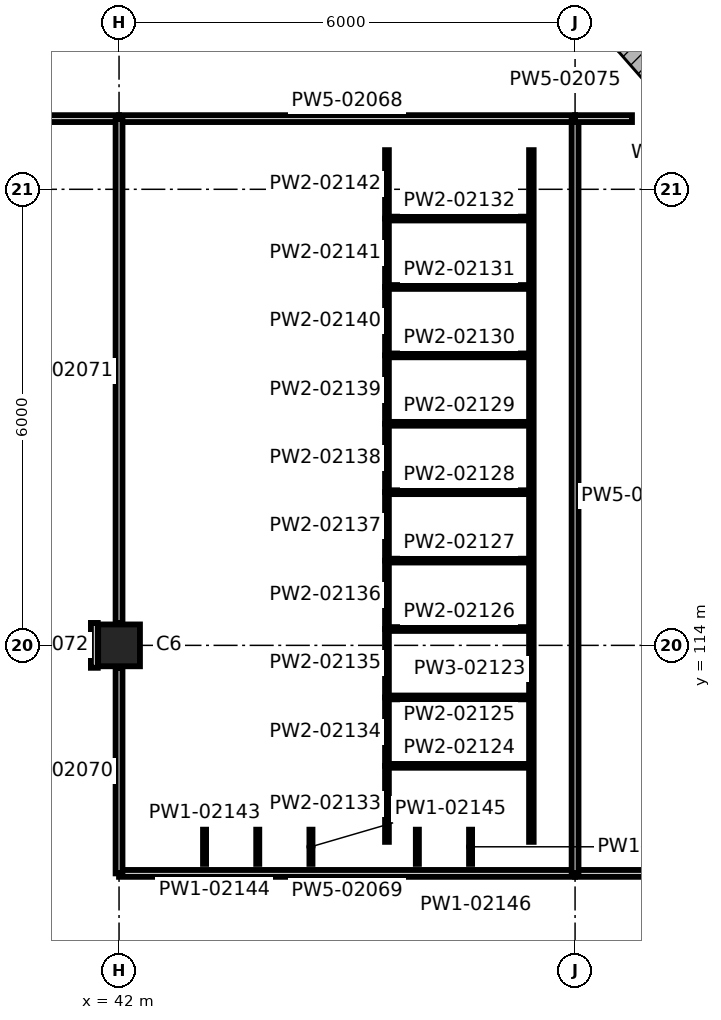
"""IFC4 building model, lengths in metres.
Left out: names, types, materials, properties, quantities, classifications, styles, units other than length and angle.
Written with IfcOpenShell. Run it as: python <this file> out.ifc"""

import sys

from ifc_helpers import new_model, si_unit, direction, frame, frame_2d, origin, origin_2d, place, context, subcontext, project, spatial, polyline, rectangle, outline, extrude, element, fill, save


model = new_model("IFC4")
c1 = context("Model", 3, precision=1e-05, world=origin(), true_north=direction((0.0, 1.0)))
c2 = subcontext(c1, "Body", "Model", "MODEL_VIEW")
j1 = project(units=[si_unit("LENGTHUNIT", "METRE"), si_unit("PLANEANGLEUNIT", "RADIAN")], contexts=[c1])
p1 = place(None, origin())
s1 = spatial("IfcSite", under=j1, at=p1, CompositionType="ELEMENT")
p2 = place(p1, origin())
s2 = spatial("IfcBuilding", under=s1, at=p2, CompositionType="ELEMENT")
p3 = place(p2, frame((0.0, 0.0, 12.0)))
s3 = spatial("IfcBuildingStorey", under=s2, at=p3, CompositionType="ELEMENT", Elevation=12.0)
p4 = place(p3, frame((42.0, 114.0, 0.0), z_axis=(0.0, 0.0, 1.0), x_axis=(1.0, 0.0, 0.0)))
e1 = element("IfcColumn", 1, at=p4, inside=s3, PredefinedType="COLUMN", context=c2, shape_type="SweptSolid", body=[
    extrude(rectangle(XDim=0.55, YDim=0.55, at=origin_2d()), origin(), (0.0, 0.0, 1.0), 4.5),
])
p5 = place(p3, frame((48.56, 121.825, 0.0), z_axis=(-0.74138193161, -0.495258620594, 0.452848462745), x_axis=(-0.555487117891, 0.831525141854, -1.792587e-05)))
e2 = element("IfcWall", 2, at=p5, inside=s3, PredefinedType="SOLIDWALL", context=c2, shape_type="SweptSolid", body=[
    extrude(outline(polyline([(0.0, 0.0), (0.897, 2.776e-17), (0.759, -4.655), (0.138, -4.654), (0.0, 0.0)])), origin(), (-9.955e-05, 0.453, 0.892), 0.449),
])
p6 = place(p3, frame((49.152, 121.151, 0.0), z_axis=(-0.67027340996, -0.587941516676, 0.452833665786), x_axis=(-0.659435029258, 0.751761559077, -2.1938488e-05)))
e3 = element("IfcWall", 3, at=p6, inside=s3, PredefinedType="SOLIDWALL", context=c2, shape_type="SweptSolid", body=[
    extrude(outline(polyline([(0.0, 0.0), (0.897, 2.776e-17), (0.759, -4.654), (0.138, -4.654), (0.0, 0.0)])), origin(), (0.0, 0.453, 0.892), 0.449),
])
p7 = place(p3, frame((49.826, 120.56, 0.0), z_axis=(-0.58793091204, -0.670281410701, 0.452835591728), x_axis=(-0.75177274522, 0.659422276866, 1.779507e-05)))
e4 = element("IfcWall", 4, at=p7, inside=s3, PredefinedType="SOLIDWALL", context=c2, shape_type="SweptSolid", body=[
    extrude(outline(polyline([(0.0, 0.0), (0.897, -5.551e-17), (0.759, -4.654), (0.138, -4.654), (0.0, 0.0)])), origin(), (-0.0, 0.453, 0.892), 0.449),
])
p8 = place(p3, frame((24.0, 120.93, 0.0), z_axis=(0.0, 0.0, 1.0), x_axis=(1.0, 0.0, 0.0)))
e5 = element("IfcWall", 5, at=p8, inside=s3, PredefinedType="PARTITIONING", context=c2, shape_type="SweptSolid", body=[
    extrude(rectangle(XDim=18.0, YDim=0.09, at=frame_2d((9.0, 0.0))), origin(), (0.0, 0.0, 1.0), 3.55),
])
p9 = place(p8, frame((9.85, 0.0, 0.0)))
e6 = element("IfcOpeningElement", 6, at=p9, cuts=e5, PredefinedType="OPENING", context=c2, shape_type="SweptSolid", body=[
    extrude(rectangle(XDim=1.8, YDim=2.1, at=frame_2d((0.9, 1.05))), frame((0.0, 0.055, 0.0), z_axis=(0.0, -1.0, 0.0), x_axis=(1.0, 0.0, 0.0)), (0.0, 0.0, 1.0), 0.11),
])
p10 = place(p8, frame((1.1, 0.0, 0.0)))
e7 = element("IfcOpeningElement", 7, at=p10, cuts=e5, PredefinedType="OPENING", context=c2, shape_type="SweptSolid", body=[
    extrude(rectangle(XDim=1.0, YDim=2.1, at=frame_2d((0.5, 1.05))), frame((0.0, 0.055, 0.0), z_axis=(0.0, -1.0, 0.0), x_axis=(1.0, 0.0, 0.0)), (0.0, 0.0, 1.0), 0.11),
])
for number, where, z_axis, x_axis in (
    (8, (42.0, 120.93, 0.0), (0.0, 0.0, 1.0), (1.0, 0.0, 0.0)),
    (9, (42.0, 111.0, 0.0), (0.0, 0.0, 1.0), (1.0, 0.0, 0.0)),
):
    element("IfcWall", number, at=place(p3, frame(where, z_axis=z_axis, x_axis=x_axis)), inside=s3, PredefinedType="PARTITIONING", context=c2, shape_type="SweptSolid", body=[
        extrude(rectangle(XDim=6.0, YDim=0.09, at=frame_2d((3.0, 0.0))), origin(), (0.0, 0.0, 1.0), 4.25),
    ])
p11 = place(p3, frame((42.0, 111.0, 0.0), z_axis=(0.0, 0.0, 1.0), x_axis=(0.0, 1.0, 0.0)))
e10 = element("IfcWall", 10, at=p11, inside=s3, PredefinedType="PARTITIONING", context=c2, shape_type="SweptSolid", body=[
    extrude(rectangle(XDim=2.705, YDim=0.09, at=frame_2d((1.353, 0.0))), origin(), (0.0, 0.0, 1.0), 4.25),
])
p12 = place(p3, frame((42.0, 114.295, 0.0), z_axis=(0.0, 0.0, 1.0), x_axis=(0.0, 1.0, 0.0)))
e11 = element("IfcWall", 11, at=p12, inside=s3, PredefinedType="PARTITIONING", context=c2, shape_type="SweptSolid", body=[
    extrude(rectangle(XDim=6.635, YDim=0.09, at=frame_2d((3.317, 0.0))), origin(), (0.0, 0.0, 1.0), 4.25),
])
p13 = place(p12, frame((1.255, 0.0, 0.0)))
e12 = element("IfcOpeningElement", 12, at=p13, cuts=e11, PredefinedType="OPENING", context=c2, shape_type="SweptSolid", body=[
    extrude(rectangle(XDim=0.92, YDim=2.04, at=frame_2d((0.46, 1.02))), frame((0.0, 0.055, 0.0), z_axis=(0.0, -1.0, 0.0), x_axis=(1.0, 0.0, 0.0)), (0.0, 0.0, 1.0), 0.11),
])
p14 = place(p3, frame((41.675, 113.705, 0.0), z_axis=(0.0, 0.0, 1.0), x_axis=(0.0, 1.0, 0.0)))
e13 = element("IfcWall", 13, at=p14, inside=s3, PredefinedType="PARTITIONING", context=c2, shape_type="SweptSolid", body=[
    extrude(rectangle(XDim=0.59, YDim=0.09, at=frame_2d((0.295, 0.0))), origin(), (0.0, 0.0, 1.0), 4.25),
])
p15 = place(p3, frame((48.0, 111.0, 0.0), z_axis=(0.0, 0.0, 1.0), x_axis=(1.0, 0.0, 0.0)))
e14 = element("IfcWall", 14, at=p15, inside=s3, PredefinedType="PARTITIONING", context=c2, shape_type="SweptSolid", body=[
    extrude(rectangle(XDim=6.0, YDim=0.09, at=frame_2d((3.0, 0.0))), origin(), (0.0, 0.0, 1.0), 4.25),
])
p16 = place(p3, frame((48.0, 111.0, 0.0), z_axis=(0.0, 0.0, 1.0), x_axis=(0.0, 1.0, 0.0)))
e15 = element("IfcWall", 15, at=p16, inside=s3, PredefinedType="PARTITIONING", context=c2, shape_type="SweptSolid", body=[
    extrude(rectangle(XDim=9.93, YDim=0.09, at=frame_2d((4.965, 0.0))), origin(), (0.0, 0.0, 1.0), 4.25),
])
p17 = place(p3, frame((48.0, 120.93, 0.0), z_axis=(0.0, 0.0, 1.0), x_axis=(1.0, 0.0, 0.0)))
e16 = element("IfcWall", 16, at=p17, inside=s3, PredefinedType="PARTITIONING", context=c2, shape_type="SweptSolid", body=[
    extrude(rectangle(XDim=0.749, YDim=0.09, at=frame_2d((0.374, 0.0))), origin(), (0.0, 0.0, 1.0), 4.25),
])
p18 = place(p3, frame((47.425, 111.415, 0.0), z_axis=(0.0, 0.0, 1.0), x_axis=(0.0, 1.0, 0.0)))
e17 = element("IfcWall", 17, at=p18, inside=s3, PredefinedType="PARTITIONING", context=c2, shape_type="SweptSolid", body=[
    extrude(rectangle(XDim=9.1, YDim=0.06, at=frame_2d((4.55, 0.0))), origin(), (0.0, 0.0, 1.0), 2.1),
])
for number, where, z_axis, x_axis in (
    (18, (45.525, 112.415, 0.0), (0.0, 0.0, 1.0), (1.0, 0.0, 0.0)),
    (19, (45.525, 113.315, 0.0), (0.0, 0.0, 1.0), (1.0, 0.0, 0.0)),
    (20, (45.525, 114.215, 0.0), (0.0, 0.0, 1.0), (1.0, 0.0, 0.0)),
    (21, (45.525, 115.115, 0.0), (0.0, 0.0, 1.0), (1.0, 0.0, 0.0)),
    (22, (45.525, 116.015, 0.0), (0.0, 0.0, 1.0), (1.0, 0.0, 0.0)),
    (23, (45.525, 116.915, 0.0), (0.0, 0.0, 1.0), (1.0, 0.0, 0.0)),
    (24, (45.525, 117.815, 0.0), (0.0, 0.0, 1.0), (1.0, 0.0, 0.0)),
    (25, (45.525, 118.715, 0.0), (0.0, 0.0, 1.0), (1.0, 0.0, 0.0)),
    (26, (45.525, 119.615, 0.0), (0.0, 0.0, 1.0), (1.0, 0.0, 0.0)),
):
    element("IfcWall", number, at=place(p3, frame(where, z_axis=z_axis, x_axis=x_axis)), inside=s3, PredefinedType="PARTITIONING", context=c2, shape_type="SweptSolid", body=[
        extrude(rectangle(XDim=1.9, YDim=0.05, at=frame_2d((0.95, 0.0))), origin(), (0.0, 0.0, 1.0), 2.1),
    ])
p19 = place(p3, frame((45.525, 111.415, 0.0), z_axis=(0.0, 0.0, 1.0), x_axis=(0.0, 1.0, 0.0)))
e27 = element("IfcWall", 27, at=p19, inside=s3, PredefinedType="PARTITIONING", context=c2, shape_type="SweptSolid", body=[
    extrude(rectangle(XDim=1.0, YDim=0.05, at=frame_2d((0.5, 0.0))), origin(), (0.0, 0.0, 1.0), 2.1),
])
p20 = place(p19, frame((0.09, 0.0, 0.0)))
e28 = element("IfcOpeningElement", 28, at=p20, cuts=e27, PredefinedType="OPENING", context=c2, shape_type="SweptSolid", body=[
    extrude(rectangle(XDim=0.82, YDim=2.0, at=frame_2d((0.41, 1.0))), frame((0.0, 0.035, 0.0), z_axis=(0.0, -1.0, 0.0), x_axis=(1.0, 0.0, 0.0)), (0.0, 0.0, 1.0), 0.07),
])
p21 = place(p3, frame((45.525, 112.415, 0.0), z_axis=(0.0, 0.0, 1.0), x_axis=(0.0, 1.0, 0.0)))
e29 = element("IfcWall", 29, at=p21, inside=s3, PredefinedType="PARTITIONING", context=c2, shape_type="SweptSolid", body=[
    extrude(rectangle(XDim=0.9, YDim=0.05, at=frame_2d((0.45, 0.0))), origin(), (0.0, 0.0, 1.0), 2.1),
])
p22 = place(p21, frame((0.075, 0.0, 0.0)))
e30 = element("IfcOpeningElement", 30, at=p22, cuts=e29, PredefinedType="OPENING", context=c2, shape_type="SweptSolid", body=[
    extrude(rectangle(XDim=0.75, YDim=2.0, at=frame_2d((0.375, 1.0))), frame((0.0, 0.035, 0.0), z_axis=(0.0, -1.0, 0.0), x_axis=(1.0, 0.0, 0.0)), (0.0, 0.0, 1.0), 0.07),
])
p23 = place(p3, frame((45.525, 113.315, 0.0), z_axis=(0.0, 0.0, 1.0), x_axis=(0.0, 1.0, 0.0)))
e31 = element("IfcWall", 31, at=p23, inside=s3, PredefinedType="PARTITIONING", context=c2, shape_type="SweptSolid", body=[
    extrude(rectangle(XDim=0.9, YDim=0.05, at=frame_2d((0.45, 0.0))), origin(), (0.0, 0.0, 1.0), 2.1),
])
p24 = place(p23, frame((0.075, 0.0, 0.0)))
e32 = element("IfcOpeningElement", 32, at=p24, cuts=e31, PredefinedType="OPENING", context=c2, shape_type="SweptSolid", body=[
    extrude(rectangle(XDim=0.75, YDim=2.0, at=frame_2d((0.375, 1.0))), frame((0.0, 0.035, 0.0), z_axis=(0.0, -1.0, 0.0), x_axis=(1.0, 0.0, 0.0)), (0.0, 0.0, 1.0), 0.07),
])
p25 = place(p3, frame((45.525, 114.215, 0.0), z_axis=(0.0, 0.0, 1.0), x_axis=(0.0, 1.0, 0.0)))
e33 = element("IfcWall", 33, at=p25, inside=s3, PredefinedType="PARTITIONING", context=c2, shape_type="SweptSolid", body=[
    extrude(rectangle(XDim=0.9, YDim=0.05, at=frame_2d((0.45, 0.0))), origin(), (0.0, 0.0, 1.0), 2.1),
])
p26 = place(p25, frame((0.075, 0.0, 0.0)))
e34 = element("IfcOpeningElement", 34, at=p26, cuts=e33, PredefinedType="OPENING", context=c2, shape_type="SweptSolid", body=[
    extrude(rectangle(XDim=0.75, YDim=2.0, at=frame_2d((0.375, 1.0))), frame((0.0, 0.035, 0.0), z_axis=(0.0, -1.0, 0.0), x_axis=(1.0, 0.0, 0.0)), (0.0, 0.0, 1.0), 0.07),
])
p27 = place(p3, frame((45.525, 115.115, 0.0), z_axis=(0.0, 0.0, 1.0), x_axis=(0.0, 1.0, 0.0)))
e35 = element("IfcWall", 35, at=p27, inside=s3, PredefinedType="PARTITIONING", context=c2, shape_type="SweptSolid", body=[
    extrude(rectangle(XDim=0.9, YDim=0.05, at=frame_2d((0.45, 0.0))), origin(), (0.0, 0.0, 1.0), 2.1),
])
p28 = place(p27, frame((0.075, 0.0, 0.0)))
e36 = element("IfcOpeningElement", 36, at=p28, cuts=e35, PredefinedType="OPENING", context=c2, shape_type="SweptSolid", body=[
    extrude(rectangle(XDim=0.75, YDim=2.0, at=frame_2d((0.375, 1.0))), frame((0.0, 0.035, 0.0), z_axis=(0.0, -1.0, 0.0), x_axis=(1.0, 0.0, 0.0)), (0.0, 0.0, 1.0), 0.07),
])
p29 = place(p3, frame((45.525, 116.015, 0.0), z_axis=(0.0, 0.0, 1.0), x_axis=(0.0, 1.0, 0.0)))
e37 = element("IfcWall", 37, at=p29, inside=s3, PredefinedType="PARTITIONING", context=c2, shape_type="SweptSolid", body=[
    extrude(rectangle(XDim=0.9, YDim=0.05, at=frame_2d((0.45, 0.0))), origin(), (0.0, 0.0, 1.0), 2.1),
])
p30 = place(p29, frame((0.075, 0.0, 0.0)))
e38 = element("IfcOpeningElement", 38, at=p30, cuts=e37, PredefinedType="OPENING", context=c2, shape_type="SweptSolid", body=[
    extrude(rectangle(XDim=0.75, YDim=2.0, at=frame_2d((0.375, 1.0))), frame((0.0, 0.035, 0.0), z_axis=(0.0, -1.0, 0.0), x_axis=(1.0, 0.0, 0.0)), (0.0, 0.0, 1.0), 0.07),
])
p31 = place(p3, frame((45.525, 116.915, 0.0), z_axis=(0.0, 0.0, 1.0), x_axis=(0.0, 1.0, 0.0)))
e39 = element("IfcWall", 39, at=p31, inside=s3, PredefinedType="PARTITIONING", context=c2, shape_type="SweptSolid", body=[
    extrude(rectangle(XDim=0.9, YDim=0.05, at=frame_2d((0.45, 0.0))), origin(), (0.0, 0.0, 1.0), 2.1),
])
p32 = place(p31, frame((0.075, 0.0, 0.0)))
e40 = element("IfcOpeningElement", 40, at=p32, cuts=e39, PredefinedType="OPENING", context=c2, shape_type="SweptSolid", body=[
    extrude(rectangle(XDim=0.75, YDim=2.0, at=frame_2d((0.375, 1.0))), frame((0.0, 0.035, 0.0), z_axis=(0.0, -1.0, 0.0), x_axis=(1.0, 0.0, 0.0)), (0.0, 0.0, 1.0), 0.07),
])
p33 = place(p3, frame((45.525, 117.815, 0.0), z_axis=(0.0, 0.0, 1.0), x_axis=(0.0, 1.0, 0.0)))
e41 = element("IfcWall", 41, at=p33, inside=s3, PredefinedType="PARTITIONING", context=c2, shape_type="SweptSolid", body=[
    extrude(rectangle(XDim=0.9, YDim=0.05, at=frame_2d((0.45, 0.0))), origin(), (0.0, 0.0, 1.0), 2.1),
])
p34 = place(p33, frame((0.075, 0.0, 0.0)))
e42 = element("IfcOpeningElement", 42, at=p34, cuts=e41, PredefinedType="OPENING", context=c2, shape_type="SweptSolid", body=[
    extrude(rectangle(XDim=0.75, YDim=2.0, at=frame_2d((0.375, 1.0))), frame((0.0, 0.035, 0.0), z_axis=(0.0, -1.0, 0.0), x_axis=(1.0, 0.0, 0.0)), (0.0, 0.0, 1.0), 0.07),
])
p35 = place(p3, frame((45.525, 118.715, 0.0), z_axis=(0.0, 0.0, 1.0), x_axis=(0.0, 1.0, 0.0)))
e43 = element("IfcWall", 43, at=p35, inside=s3, PredefinedType="PARTITIONING", context=c2, shape_type="SweptSolid", body=[
    extrude(rectangle(XDim=0.9, YDim=0.05, at=frame_2d((0.45, 0.0))), origin(), (0.0, 0.0, 1.0), 2.1),
])
p36 = place(p35, frame((0.075, 0.0, 0.0)))
e44 = element("IfcOpeningElement", 44, at=p36, cuts=e43, PredefinedType="OPENING", context=c2, shape_type="SweptSolid", body=[
    extrude(rectangle(XDim=0.75, YDim=2.0, at=frame_2d((0.375, 1.0))), frame((0.0, 0.035, 0.0), z_axis=(0.0, -1.0, 0.0), x_axis=(1.0, 0.0, 0.0)), (0.0, 0.0, 1.0), 0.07),
])
p37 = place(p3, frame((45.525, 119.615, 0.0), z_axis=(0.0, 0.0, 1.0), x_axis=(0.0, 1.0, 0.0)))
e45 = element("IfcWall", 45, at=p37, inside=s3, PredefinedType="PARTITIONING", context=c2, shape_type="SweptSolid", body=[
    extrude(rectangle(XDim=0.9, YDim=0.05, at=frame_2d((0.45, 0.0))), origin(), (0.0, 0.0, 1.0), 2.1),
])
p38 = place(p37, frame((0.075, 0.0, 0.0)))
e46 = element("IfcOpeningElement", 46, at=p38, cuts=e45, PredefinedType="OPENING", context=c2, shape_type="SweptSolid", body=[
    extrude(rectangle(XDim=0.75, YDim=2.0, at=frame_2d((0.375, 1.0))), frame((0.0, 0.035, 0.0), z_axis=(0.0, -1.0, 0.0), x_axis=(1.0, 0.0, 0.0)), (0.0, 0.0, 1.0), 0.07),
])
for number, where, z_axis, x_axis in (
    (47, (43.125, 111.125, 0.0), (0.0, 0.0, 1.0), (0.0, 1.0, 0.0)),
    (48, (43.825, 111.125, 0.0), (0.0, 0.0, 1.0), (0.0, 1.0, 0.0)),
    (49, (44.525, 111.125, 0.0), (0.0, 0.0, 1.0), (0.0, 1.0, 0.0)),
    (50, (45.925, 111.125, 0.0), (0.0, 0.0, 1.0), (0.0, 1.0, 0.0)),
    (51, (46.625, 111.125, 0.0), (0.0, 0.0, 1.0), (0.0, 1.0, 0.0)),
):
    element("IfcWall", number, at=place(p3, frame(where, z_axis=z_axis, x_axis=x_axis)), inside=s3, PredefinedType="PARTITIONING", context=c2, shape_type="SweptSolid", body=[
        extrude(rectangle(XDim=0.45, YDim=0.04, at=frame_2d((0.225, 0.0))), origin(), (0.0, 0.0, 1.0), 1.8),
    ])
p39 = place(p13, frame((0.92, 0.0, 0.0), z_axis=(0.0, 0.0, 1.0), x_axis=(-1.0, 0.0, 0.0)))
e52 = element("IfcDoor", 52, at=p39, inside=s3, OperationType="SINGLE_SWING_RIGHT", PredefinedType="DOOR", context=c2, shape_type="SweptSolid", body=[
    extrude(rectangle(XDim=0.92, YDim=2.04, at=frame_2d((0.46, 1.02))), frame((0.0, 0.025, 0.0), z_axis=(0.0, -1.0, 0.0), x_axis=(1.0, 0.0, 0.0)), (0.0, 0.0, 1.0), 0.05),
])
fill(e12, e52)
p40 = place(p20, frame((0.82, 0.0, 0.0), z_axis=(0.0, 0.0, 1.0), x_axis=(-1.0, 0.0, 0.0)))
e53 = element("IfcDoor", 53, at=p40, inside=s3, OperationType="SINGLE_SWING_RIGHT", PredefinedType="DOOR", context=c2, shape_type="SweptSolid", body=[
    extrude(rectangle(XDim=0.82, YDim=2.0, at=frame_2d((0.41, 1.0))), frame((0.0, 0.025, 0.0), z_axis=(0.0, -1.0, 0.0), x_axis=(1.0, 0.0, 0.0)), (0.0, 0.0, 1.0), 0.05),
])
fill(e28, e53)
p41 = place(p22, frame((0.75, 0.0, 0.0), z_axis=(0.0, 0.0, 1.0), x_axis=(-1.0, 0.0, 0.0)))
e54 = element("IfcDoor", 54, at=p41, inside=s3, OperationType="SINGLE_SWING_LEFT", PredefinedType="DOOR", context=c2, shape_type="SweptSolid", body=[
    extrude(rectangle(XDim=0.75, YDim=2.0, at=frame_2d((0.375, 1.0))), frame((0.0, 0.025, 0.0), z_axis=(0.0, -1.0, 0.0), x_axis=(1.0, 0.0, 0.0)), (0.0, 0.0, 1.0), 0.05),
])
fill(e30, e54)
p42 = place(p24, frame((0.75, 0.0, 0.0), z_axis=(0.0, 0.0, 1.0), x_axis=(-1.0, 0.0, 0.0)))
e55 = element("IfcDoor", 55, at=p42, inside=s3, OperationType="SINGLE_SWING_RIGHT", PredefinedType="DOOR", context=c2, shape_type="SweptSolid", body=[
    extrude(rectangle(XDim=0.75, YDim=2.0, at=frame_2d((0.375, 1.0))), frame((0.0, 0.025, 0.0), z_axis=(0.0, -1.0, 0.0), x_axis=(1.0, 0.0, 0.0)), (0.0, 0.0, 1.0), 0.05),
])
fill(e32, e55)
p43 = place(p26, frame((0.75, 0.0, 0.0), z_axis=(0.0, 0.0, 1.0), x_axis=(-1.0, 0.0, 0.0)))
e56 = element("IfcDoor", 56, at=p43, inside=s3, OperationType="SINGLE_SWING_LEFT", PredefinedType="DOOR", context=c2, shape_type="SweptSolid", body=[
    extrude(rectangle(XDim=0.75, YDim=2.0, at=frame_2d((0.375, 1.0))), frame((0.0, 0.025, 0.0), z_axis=(0.0, -1.0, 0.0), x_axis=(1.0, 0.0, 0.0)), (0.0, 0.0, 1.0), 0.05),
])
fill(e34, e56)
p44 = place(p28, frame((0.75, 0.0, 0.0), z_axis=(0.0, 0.0, 1.0), x_axis=(-1.0, 0.0, 0.0)))
e57 = element("IfcDoor", 57, at=p44, inside=s3, OperationType="SINGLE_SWING_RIGHT", PredefinedType="DOOR", context=c2, shape_type="SweptSolid", body=[
    extrude(rectangle(XDim=0.75, YDim=2.0, at=frame_2d((0.375, 1.0))), frame((0.0, 0.025, 0.0), z_axis=(0.0, -1.0, 0.0), x_axis=(1.0, 0.0, 0.0)), (0.0, 0.0, 1.0), 0.05),
])
fill(e36, e57)
p45 = place(p30, frame((0.75, 0.0, 0.0), z_axis=(0.0, 0.0, 1.0), x_axis=(-1.0, 0.0, 0.0)))
e58 = element("IfcDoor", 58, at=p45, inside=s3, OperationType="SINGLE_SWING_LEFT", PredefinedType="DOOR", context=c2, shape_type="SweptSolid", body=[
    extrude(rectangle(XDim=0.75, YDim=2.0, at=frame_2d((0.375, 1.0))), frame((0.0, 0.025, 0.0), z_axis=(0.0, -1.0, 0.0), x_axis=(1.0, 0.0, 0.0)), (0.0, 0.0, 1.0), 0.05),
])
fill(e38, e58)
p46 = place(p32, frame((0.75, 0.0, 0.0), z_axis=(0.0, 0.0, 1.0), x_axis=(-1.0, 0.0, 0.0)))
e59 = element("IfcDoor", 59, at=p46, inside=s3, OperationType="SINGLE_SWING_RIGHT", PredefinedType="DOOR", context=c2, shape_type="SweptSolid", body=[
    extrude(rectangle(XDim=0.75, YDim=2.0, at=frame_2d((0.375, 1.0))), frame((0.0, 0.025, 0.0), z_axis=(0.0, -1.0, 0.0), x_axis=(1.0, 0.0, 0.0)), (0.0, 0.0, 1.0), 0.05),
])
fill(e40, e59)
p47 = place(p34, frame((0.75, 0.0, 0.0), z_axis=(0.0, 0.0, 1.0), x_axis=(-1.0, 0.0, 0.0)))
e60 = element("IfcDoor", 60, at=p47, inside=s3, OperationType="SINGLE_SWING_LEFT", PredefinedType="DOOR", context=c2, shape_type="SweptSolid", body=[
    extrude(rectangle(XDim=0.75, YDim=2.0, at=frame_2d((0.375, 1.0))), frame((0.0, 0.025, 0.0), z_axis=(0.0, -1.0, 0.0), x_axis=(1.0, 0.0, 0.0)), (0.0, 0.0, 1.0), 0.05),
])
fill(e42, e60)
p48 = place(p36, frame((0.75, 0.0, 0.0), z_axis=(0.0, 0.0, 1.0), x_axis=(-1.0, 0.0, 0.0)))
e61 = element("IfcDoor", 61, at=p48, inside=s3, OperationType="SINGLE_SWING_RIGHT", PredefinedType="DOOR", context=c2, shape_type="SweptSolid", body=[
    extrude(rectangle(XDim=0.75, YDim=2.0, at=frame_2d((0.375, 1.0))), frame((0.0, 0.025, 0.0), z_axis=(0.0, -1.0, 0.0), x_axis=(1.0, 0.0, 0.0)), (0.0, 0.0, 1.0), 0.05),
])
fill(e44, e61)
p49 = place(p38, frame((0.75, 0.0, 0.0), z_axis=(0.0, 0.0, 1.0), x_axis=(-1.0, 0.0, 0.0)))
e62 = element("IfcDoor", 62, at=p49, inside=s3, OperationType="SINGLE_SWING_LEFT", PredefinedType="DOOR", context=c2, shape_type="SweptSolid", body=[
    extrude(rectangle(XDim=0.75, YDim=2.0, at=frame_2d((0.375, 1.0))), frame((0.0, 0.025, 0.0), z_axis=(0.0, -1.0, 0.0), x_axis=(1.0, 0.0, 0.0)), (0.0, 0.0, 1.0), 0.05),
])
fill(e46, e62)
save(model, sys.argv[1])
